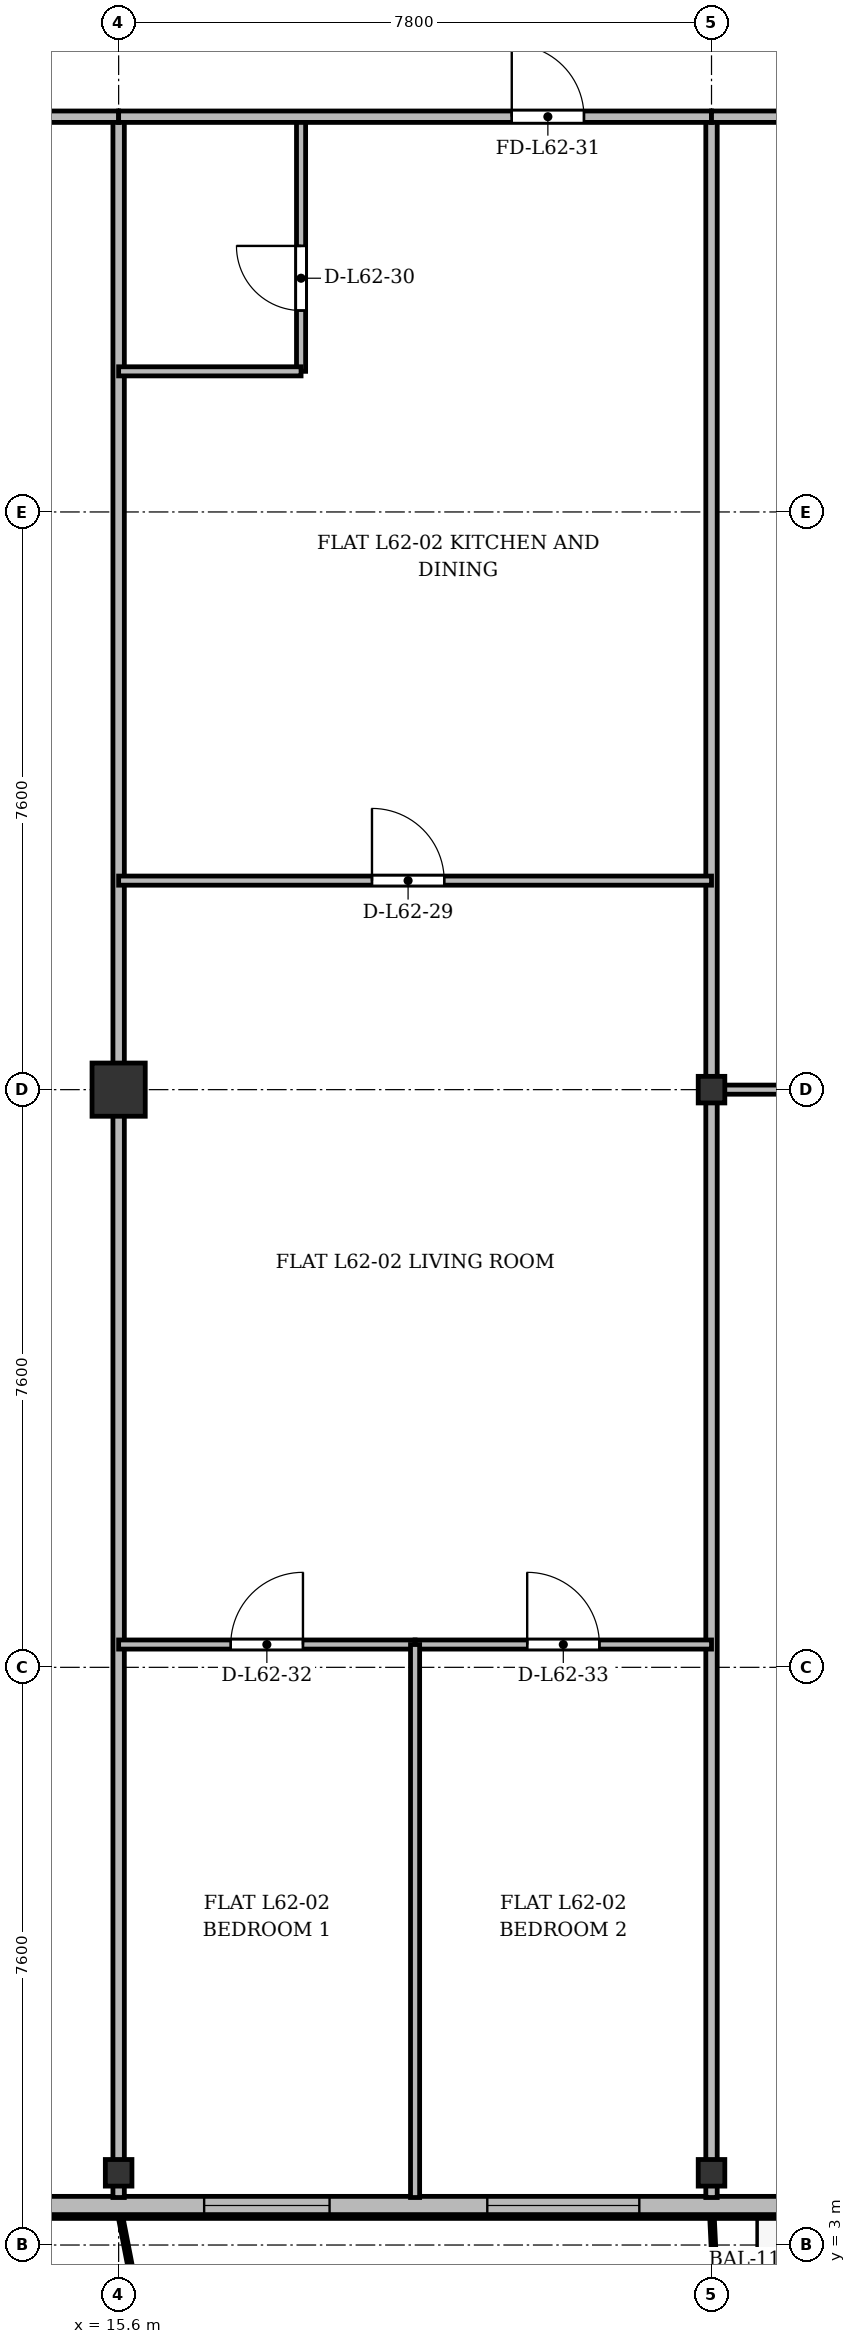
"""IFC4 building model, lengths in metres.
Left out: names, types, materials, properties, quantities, classifications, styles, units other than length and angle.
Written with IfcOpenShell. Run it as: python <this file> out.ifc"""

import sys

from ifc_helpers import new_model, si_unit, direction, frame, frame_2d, origin, origin_2d, place, context, subcontext, project, spatial, rectangle, i_section, extrude, source, transform, mapped, element, fill, save


model = new_model("IFC4")
c1 = context("Model", 3, precision=1e-05, world=origin(), true_north=direction((0.0, 1.0)))
c2 = subcontext(c1, "Body", "Model", "MODEL_VIEW")
j1 = project(units=[si_unit("LENGTHUNIT", "METRE"), si_unit("PLANEANGLEUNIT", "RADIAN")], contexts=[c1])
p1 = place(None, origin())
s1 = spatial("IfcSite", under=j1, at=p1, CompositionType="ELEMENT")
p2 = place(p1, origin())
s2 = spatial("IfcBuilding", under=s1, at=p2, CompositionType="ELEMENT")
p3 = place(p2, frame((0.0, 0.0, 237.3)))
s3 = spatial("IfcBuildingStorey", under=s2, at=p3, CompositionType="ELEMENT", Elevation=237.3)
m1 = source(origin(), c2, "Body", "SweptSolid", [
    extrude(i_section(OverallWidth=0.35, OverallDepth=0.35, WebThickness=0.018, FlangeThickness=0.028, at=origin_2d()), origin(), (0.0, 0.0, 1.0), 3.6),
])
p4 = place(p3, frame((15.6, 3.95, 0.0), z_axis=(0.0, 0.0, 1.0), x_axis=(1.0, 0.0, 0.0)))
e1 = element("IfcColumn", 1, at=p4, inside=s3, PredefinedType="COLUMN", context=c2, shape_type="MappedRepresentation", body=[
    mapped(m1, transform((0.0, 0.0, 0.0), x_axis=(1.0, 0.0, 0.0), y_axis=(0.0, 1.0, 0.0), z_axis=(0.0, 0.0, 1.0), scale=1.0)),
])
m2 = source(origin(), c2, "Body", "SweptSolid", [
    extrude(rectangle(XDim=0.7, YDim=0.7, at=origin_2d()), origin(), (0.0, 0.0, 1.0), 3.6),
])
p5 = place(p3, frame((15.6, 18.2, 0.0), z_axis=(0.0, 0.0, 1.0), x_axis=(1.0, 0.0, 0.0)))
e2 = element("IfcColumn", 2, at=p5, inside=s3, PredefinedType="COLUMN", context=c2, shape_type="MappedRepresentation", body=[
    mapped(m2, transform((0.0, 0.0, 0.0), x_axis=(1.0, 0.0, 0.0), y_axis=(0.0, 1.0, 0.0), z_axis=(0.0, 0.0, 1.0), scale=1.0)),
])
for number, where, z_axis, x_axis in (
    (3, (23.4, 3.95, 0.0), (0.0, 0.0, 1.0), (1.0, 0.0, 0.0)),
    (4, (23.4, 18.2, 0.0), (0.0, 0.0, 1.0), (1.0, 0.0, 0.0)),
):
    element("IfcColumn", number, at=place(p3, frame(where, z_axis=z_axis, x_axis=x_axis)), inside=s3, PredefinedType="COLUMN", context=c2, shape_type="MappedRepresentation", body=[
        mapped(m1, transform((0.0, 0.0, 0.0), x_axis=(1.0, 0.0, 0.0), y_axis=(0.0, 1.0, 0.0), z_axis=(0.0, 0.0, 1.0), scale=1.0)),
    ])
p6 = place(p3, frame((44.8, 3.52, 0.0), z_axis=(0.0, 0.0, 1.0), x_axis=(-1.0, 0.0, 0.0)))
e5 = element("IfcWall", 5, at=p6, inside=s3, PredefinedType="SOLIDWALL", context=c2, shape_type="SweptSolid", body=[
    extrude(rectangle(XDim=33.8, YDim=0.24, at=frame_2d((16.9, 0.0))), origin(), (0.0, 0.0, 1.0), 3.22),
])
p7 = place(p6, frame((2.3, 0.0, 0.9)))
e6 = element("IfcOpeningElement", 6, at=p7, cuts=e5, PredefinedType="OPENING", context=c2, shape_type="SweptSolid", body=[
    extrude(rectangle(XDim=2.0, YDim=1.95, at=frame_2d((1.0, 0.975))), frame((0.0, 0.13, 0.0), z_axis=(0.0, -1.0, 0.0), x_axis=(1.0, 0.0, 0.0)), (0.0, 0.0, 1.0), 0.26),
])
p8 = place(p6, frame((6.208, 0.0, 0.9)))
e7 = element("IfcOpeningElement", 7, at=p8, cuts=e5, PredefinedType="OPENING", context=c2, shape_type="SweptSolid", body=[
    extrude(rectangle(XDim=1.65, YDim=1.85, at=frame_2d((0.825, 0.925))), frame((0.0, 0.13, 0.0), z_axis=(0.0, -1.0, 0.0), x_axis=(1.0, 0.0, 0.0)), (0.0, 0.0, 1.0), 0.26),
])
p9 = place(p6, frame((9.0, 0.0, 0.9)))
e8 = element("IfcOpeningElement", 8, at=p9, cuts=e5, PredefinedType="OPENING", context=c2, shape_type="SweptSolid", body=[
    extrude(rectangle(XDim=1.8, YDim=1.8, at=frame_2d((0.9, 0.9))), frame((0.0, 0.13, 0.0), z_axis=(0.0, -1.0, 0.0), x_axis=(1.0, 0.0, 0.0)), (0.0, 0.0, 1.0), 0.26),
])
p10 = place(p6, frame((11.666, 0.0, 0.9)))
e9 = element("IfcOpeningElement", 9, at=p10, cuts=e5, PredefinedType="OPENING", context=c2, shape_type="SweptSolid", body=[
    extrude(rectangle(XDim=2.2, YDim=1.8, at=frame_2d((1.1, 0.9))), frame((0.0, 0.13, 0.0), z_axis=(0.0, -1.0, 0.0), x_axis=(1.0, 0.0, 0.0)), (0.0, 0.0, 1.0), 0.26),
])
p11 = place(p6, frame((17.291, 0.0, 0.0)))
e10 = element("IfcOpeningElement", 10, at=p11, cuts=e5, PredefinedType="OPENING", context=c2, shape_type="SweptSolid", body=[
    extrude(rectangle(XDim=1.2, YDim=2.2, at=frame_2d((0.6, 1.1))), frame((0.0, 0.13, 0.0), z_axis=(0.0, -1.0, 0.0), x_axis=(1.0, 0.0, 0.0)), (0.0, 0.0, 1.0), 0.26),
])
p12 = place(p6, frame((22.35, 0.0, 0.9)))
e11 = element("IfcOpeningElement", 11, at=p12, cuts=e5, PredefinedType="OPENING", context=c2, shape_type="SweptSolid", body=[
    extrude(rectangle(XDim=2.0, YDim=1.95, at=frame_2d((1.0, 0.975))), frame((0.0, 0.13, 0.0), z_axis=(0.0, -1.0, 0.0), x_axis=(1.0, 0.0, 0.0)), (0.0, 0.0, 1.0), 0.26),
])
p13 = place(p6, frame((26.425, 0.0, 0.9)))
e12 = element("IfcOpeningElement", 12, at=p13, cuts=e5, PredefinedType="OPENING", context=c2, shape_type="SweptSolid", body=[
    extrude(rectangle(XDim=1.65, YDim=1.85, at=frame_2d((0.825, 0.925))), frame((0.0, 0.13, 0.0), z_axis=(0.0, -1.0, 0.0), x_axis=(1.0, 0.0, 0.0)), (0.0, 0.0, 1.0), 0.26),
])
p14 = place(p6, frame((30.555, 0.0, 0.9)))
e13 = element("IfcOpeningElement", 13, at=p14, cuts=e5, PredefinedType="OPENING", context=c2, shape_type="SweptSolid", body=[
    extrude(rectangle(XDim=1.8, YDim=1.8, at=frame_2d((0.9, 0.9))), frame((0.0, 0.13, 0.0), z_axis=(0.0, -1.0, 0.0), x_axis=(1.0, 0.0, 0.0)), (0.0, 0.0, 1.0), 0.26),
])
for number, where, z_axis, x_axis in (
    (14, (15.6, 3.625, 0.0), (0.0, 0.0, 1.0), (0.0, 1.0, 0.0)),
    (15, (23.4, 3.625, 0.0), (0.0, 0.0, 1.0), (0.0, 1.0, 0.0)),
):
    element("IfcWall", number, at=place(p3, frame(where, z_axis=z_axis, x_axis=x_axis)), inside=s3, PredefinedType="PARTITIONING", context=c2, shape_type="SweptSolid", body=[
        extrude(rectangle(XDim=27.375, YDim=0.15, at=frame_2d((13.688, 0.0))), origin(), (0.0, 0.0, 1.0), 2.72),
    ])
p15 = place(p3, frame((8.225, 31.0, 0.0), z_axis=(0.0, 0.0, 1.0), x_axis=(1.0, 0.0, 0.0)))
e16 = element("IfcWall", 16, at=p15, inside=s3, PredefinedType="PARTITIONING", context=c2, shape_type="SweptSolid", body=[
    extrude(rectangle(XDim=7.375, YDim=0.15, at=frame_2d((3.688, 0.0))), origin(), (0.0, 0.0, 1.0), 2.72),
])
p16 = place(p15, frame((2.795, 0.0, 0.0)))
e17 = element("IfcOpeningElement", 17, at=p16, cuts=e16, PredefinedType="OPENING", context=c2, shape_type="SweptSolid", body=[
    extrude(rectangle(XDim=1.6, YDim=2.2, at=frame_2d((0.8, 1.1))), frame((0.0, 0.085, 0.0), z_axis=(0.0, -1.0, 0.0), x_axis=(1.0, 0.0, 0.0)), (0.0, 0.0, 1.0), 0.17),
])
p17 = place(p3, frame((15.6, 20.95, 0.0), z_axis=(0.0, 0.0, 1.0), x_axis=(1.0, 0.0, 0.0)))
e18 = element("IfcWall", 18, at=p17, inside=s3, PredefinedType="PARTITIONING", context=c2, shape_type="SweptSolid", body=[
    extrude(rectangle(XDim=7.8, YDim=0.12, at=frame_2d((3.9, 0.0))), origin(), (0.0, 0.0, 1.0), 2.72),
])
p18 = place(p17, frame((3.333, 0.0, 0.0)))
e19 = element("IfcOpeningElement", 19, at=p18, cuts=e18, PredefinedType="OPENING", context=c2, shape_type="SweptSolid", body=[
    extrude(rectangle(XDim=0.95, YDim=2.15, at=frame_2d((0.475, 1.075))), frame((0.0, 0.07, 0.0), z_axis=(0.0, -1.0, 0.0), x_axis=(1.0, 0.0, 0.0)), (0.0, 0.0, 1.0), 0.14),
])
p19 = place(p3, frame((18.0, 27.65, 0.0), z_axis=(0.0, 0.0, 1.0), x_axis=(0.0, 1.0, 0.0)))
e20 = element("IfcWall", 20, at=p19, inside=s3, PredefinedType="PARTITIONING", context=c2, shape_type="SweptSolid", body=[
    extrude(rectangle(XDim=3.35, YDim=0.12, at=frame_2d((1.675, 0.0))), origin(), (0.0, 0.0, 1.0), 3.22),
])
p20 = place(p19, frame((0.8, 0.0, 0.0)))
e21 = element("IfcOpeningElement", 21, at=p20, cuts=e20, PredefinedType="OPENING", context=c2, shape_type="SweptSolid", body=[
    extrude(rectangle(XDim=0.85, YDim=2.1, at=frame_2d((0.425, 1.05))), frame((0.0, 0.07, 0.0), z_axis=(0.0, -1.0, 0.0), x_axis=(1.0, 0.0, 0.0)), (0.0, 0.0, 1.0), 0.14),
])
p21 = place(p3, frame((15.6, 27.65, 0.0), z_axis=(0.0, 0.0, 1.0), x_axis=(1.0, 0.0, 0.0)))
e22 = element("IfcWall", 22, at=p21, inside=s3, PredefinedType="PARTITIONING", context=c2, shape_type="SweptSolid", body=[
    extrude(rectangle(XDim=2.4, YDim=0.12, at=frame_2d((1.2, 0.0))), origin(), (0.0, 0.0, 1.0), 2.72),
])
p22 = place(p3, frame((15.6, 31.0, 0.0), z_axis=(0.0, 0.0, 1.0), x_axis=(1.0, 0.0, 0.0)))
e23 = element("IfcWall", 23, at=p22, inside=s3, PredefinedType="PARTITIONING", context=c2, shape_type="SweptSolid", body=[
    extrude(rectangle(XDim=7.8, YDim=0.15, at=frame_2d((3.9, 0.0))), origin(), (0.0, 0.0, 1.0), 2.72),
])
p23 = place(p22, frame((5.172, 0.0, 0.0)))
e24 = element("IfcOpeningElement", 24, at=p23, cuts=e23, PredefinedType="OPENING", context=c2, shape_type="SweptSolid", body=[
    extrude(rectangle(XDim=0.95, YDim=2.15, at=frame_2d((0.475, 1.075))), frame((0.0, 0.085, 0.0), z_axis=(0.0, -1.0, 0.0), x_axis=(1.0, 0.0, 0.0)), (0.0, 0.0, 1.0), 0.17),
])
p24 = place(p3, frame((15.6, 10.9, 0.0), z_axis=(0.0, 0.0, 1.0), x_axis=(1.0, 0.0, 0.0)))
e25 = element("IfcWall", 25, at=p24, inside=s3, PredefinedType="PARTITIONING", context=c2, shape_type="SweptSolid", body=[
    extrude(rectangle(XDim=3.9, YDim=0.12, at=frame_2d((1.95, 0.0))), origin(), (0.0, 0.0, 1.0), 2.72),
])
p25 = place(p24, frame((1.475, 0.0, 0.0)))
e26 = element("IfcOpeningElement", 26, at=p25, cuts=e25, PredefinedType="OPENING", context=c2, shape_type="SweptSolid", body=[
    extrude(rectangle(XDim=0.95, YDim=2.15, at=frame_2d((0.475, 1.075))), frame((0.0, 0.07, 0.0), z_axis=(0.0, -1.0, 0.0), x_axis=(1.0, 0.0, 0.0)), (0.0, 0.0, 1.0), 0.14),
])
p26 = place(p3, frame((19.5, 10.9, 0.0), z_axis=(0.0, 0.0, 1.0), x_axis=(1.0, 0.0, 0.0)))
e27 = element("IfcWall", 27, at=p26, inside=s3, PredefinedType="PARTITIONING", context=c2, shape_type="SweptSolid", body=[
    extrude(rectangle(XDim=3.9, YDim=0.12, at=frame_2d((1.95, 0.0))), origin(), (0.0, 0.0, 1.0), 2.72),
])
p27 = place(p26, frame((1.475, 0.0, 0.0)))
e28 = element("IfcOpeningElement", 28, at=p27, cuts=e27, PredefinedType="OPENING", context=c2, shape_type="SweptSolid", body=[
    extrude(rectangle(XDim=0.95, YDim=2.15, at=frame_2d((0.475, 1.075))), frame((0.0, 0.07, 0.0), z_axis=(0.0, -1.0, 0.0), x_axis=(1.0, 0.0, 0.0)), (0.0, 0.0, 1.0), 0.14),
])
p28 = place(p3, frame((19.5, 3.625, 0.0), z_axis=(0.0, 0.0, 1.0), x_axis=(0.0, 1.0, 0.0)))
e29 = element("IfcWall", 29, at=p28, inside=s3, PredefinedType="PARTITIONING", context=c2, shape_type="SweptSolid", body=[
    extrude(rectangle(XDim=7.275, YDim=0.12, at=frame_2d((3.637, 0.0))), origin(), (0.0, 0.0, 1.0), 2.77),
])
p29 = place(p3, frame((23.4, 31.0, 0.0), z_axis=(0.0, 0.0, 1.0), x_axis=(1.0, 0.0, 0.0)))
e30 = element("IfcWall", 30, at=p29, inside=s3, PredefinedType="PARTITIONING", context=c2, shape_type="SweptSolid", body=[
    extrude(rectangle(XDim=7.2, YDim=0.15, at=frame_2d((3.6, 0.0))), origin(), (0.0, 0.0, 1.0), 2.72),
])
p30 = place(p29, frame((3.125, 0.0, 0.0)))
e31 = element("IfcOpeningElement", 31, at=p30, cuts=e30, PredefinedType="OPENING", context=c2, shape_type="SweptSolid", body=[
    extrude(rectangle(XDim=0.95, YDim=2.15, at=frame_2d((0.475, 1.075))), frame((0.0, 0.085, 0.0), z_axis=(0.0, -1.0, 0.0), x_axis=(1.0, 0.0, 0.0)), (0.0, 0.0, 1.0), 0.17),
])
p31 = place(p3, frame((23.4, 18.2, 0.0), z_axis=(0.0, 0.0, 1.0), x_axis=(1.0, 0.0, 0.0)))
e32 = element("IfcWall", 32, at=p31, inside=s3, PredefinedType="PARTITIONING", context=c2, shape_type="SweptSolid", body=[
    extrude(rectangle(XDim=7.2, YDim=0.12, at=frame_2d((3.6, 0.0))), origin(), (0.0, 0.0, 1.0), 2.77),
])
p32 = place(p31, frame((3.125, 0.0, 0.0)))
e33 = element("IfcOpeningElement", 33, at=p32, cuts=e32, PredefinedType="OPENING", context=c2, shape_type="SweptSolid", body=[
    extrude(rectangle(XDim=0.95, YDim=2.15, at=frame_2d((0.475, 1.075))), frame((0.0, 0.07, 0.0), z_axis=(0.0, -1.0, 0.0), x_axis=(1.0, 0.0, 0.0)), (0.0, 0.0, 1.0), 0.14),
])
m3 = source(origin(), c2, "Body", "SweptSolid", [
    extrude(rectangle(XDim=2.0, YDim=1.95, at=frame_2d((1.0, 0.975))), frame((0.0, 0.03, 0.0), z_axis=(0.0, -1.0, 0.0), x_axis=(1.0, 0.0, 0.0)), (0.0, 0.0, 1.0), 0.06),
])
p33 = place(p12, origin())
e34 = element("IfcWindow", 34, at=p33, inside=s3, PartitioningType="SINGLE_PANEL", PredefinedType="WINDOW", context=c2, shape_type="MappedRepresentation", body=[
    mapped(m3, transform((0.0, 0.0, 0.0), x_axis=(1.0, 0.0, 0.0), y_axis=(0.0, 1.0, 0.0), z_axis=(0.0, 0.0, 1.0), scale=1.0)),
])
fill(e11, e34)
m4 = source(origin(), c2, "Body", "SweptSolid", [
    extrude(rectangle(XDim=1.65, YDim=1.85, at=frame_2d((0.825, 0.925))), frame((0.0, 0.03, 0.0), z_axis=(0.0, -1.0, 0.0), x_axis=(1.0, 0.0, 0.0)), (0.0, 0.0, 1.0), 0.06),
])
p34 = place(p13, origin())
e35 = element("IfcWindow", 35, at=p34, inside=s3, PartitioningType="SINGLE_PANEL", PredefinedType="WINDOW", context=c2, shape_type="MappedRepresentation", body=[
    mapped(m4, transform((0.0, 0.0, 0.0), x_axis=(1.0, 0.0, 0.0), y_axis=(0.0, 1.0, 0.0), z_axis=(0.0, 0.0, 1.0), scale=1.0)),
])
fill(e12, e35)
m5 = source(origin(), c2, "Body", "SweptSolid", [
    extrude(rectangle(XDim=0.95, YDim=2.15, at=frame_2d((0.475, 1.075))), frame((0.0, 0.025, 0.0), z_axis=(0.0, -1.0, 0.0), x_axis=(1.0, 0.0, 0.0)), (0.0, 0.0, 1.0), 0.05),
])
p35 = place(p18, origin())
e36 = element("IfcDoor", 36, at=p35, inside=s3, OperationType="SINGLE_SWING_LEFT", PredefinedType="DOOR", context=c2, shape_type="MappedRepresentation", body=[
    mapped(m5, transform((0.0, 0.0, 0.0), x_axis=(1.0, 0.0, 0.0), y_axis=(0.0, 1.0, 0.0), z_axis=(0.0, 0.0, 1.0), scale=1.0)),
])
fill(e19, e36)
m6 = source(origin(), c2, "Body", "SweptSolid", [
    extrude(rectangle(XDim=0.85, YDim=2.1, at=frame_2d((0.425, 1.05))), frame((0.0, 0.025, 0.0), z_axis=(0.0, -1.0, 0.0), x_axis=(1.0, 0.0, 0.0)), (0.0, 0.0, 1.0), 0.05),
])
p36 = place(p20, origin())
e37 = element("IfcDoor", 37, at=p36, inside=s3, OperationType="SINGLE_SWING_RIGHT", PredefinedType="DOOR", context=c2, shape_type="MappedRepresentation", body=[
    mapped(m6, transform((0.0, 0.0, 0.0), x_axis=(1.0, 0.0, 0.0), y_axis=(0.0, 1.0, 0.0), z_axis=(0.0, 0.0, 1.0), scale=1.0)),
])
fill(e21, e37)
p37 = place(p23, origin())
e38 = element("IfcDoor", 38, at=p37, inside=s3, OperationType="SINGLE_SWING_LEFT", PredefinedType="DOOR", context=c2, shape_type="MappedRepresentation", body=[
    mapped(m5, transform((0.0, 0.0, 0.0), x_axis=(1.0, 0.0, 0.0), y_axis=(0.0, 1.0, 0.0), z_axis=(0.0, 0.0, 1.0), scale=1.0)),
])
fill(e24, e38)
p38 = place(p25, origin())
e39 = element("IfcDoor", 39, at=p38, inside=s3, OperationType="SINGLE_SWING_RIGHT", PredefinedType="DOOR", context=c2, shape_type="MappedRepresentation", body=[
    mapped(m5, transform((0.0, 0.0, 0.0), x_axis=(1.0, 0.0, 0.0), y_axis=(0.0, 1.0, 0.0), z_axis=(0.0, 0.0, 1.0), scale=1.0)),
])
fill(e26, e39)
p39 = place(p27, origin())
e40 = element("IfcDoor", 40, at=p39, inside=s3, OperationType="SINGLE_SWING_LEFT", PredefinedType="DOOR", context=c2, shape_type="MappedRepresentation", body=[
    mapped(m5, transform((0.0, 0.0, 0.0), x_axis=(1.0, 0.0, 0.0), y_axis=(0.0, 1.0, 0.0), z_axis=(0.0, 0.0, 1.0), scale=1.0)),
])
fill(e28, e40)
save(model, sys.argv[1])
